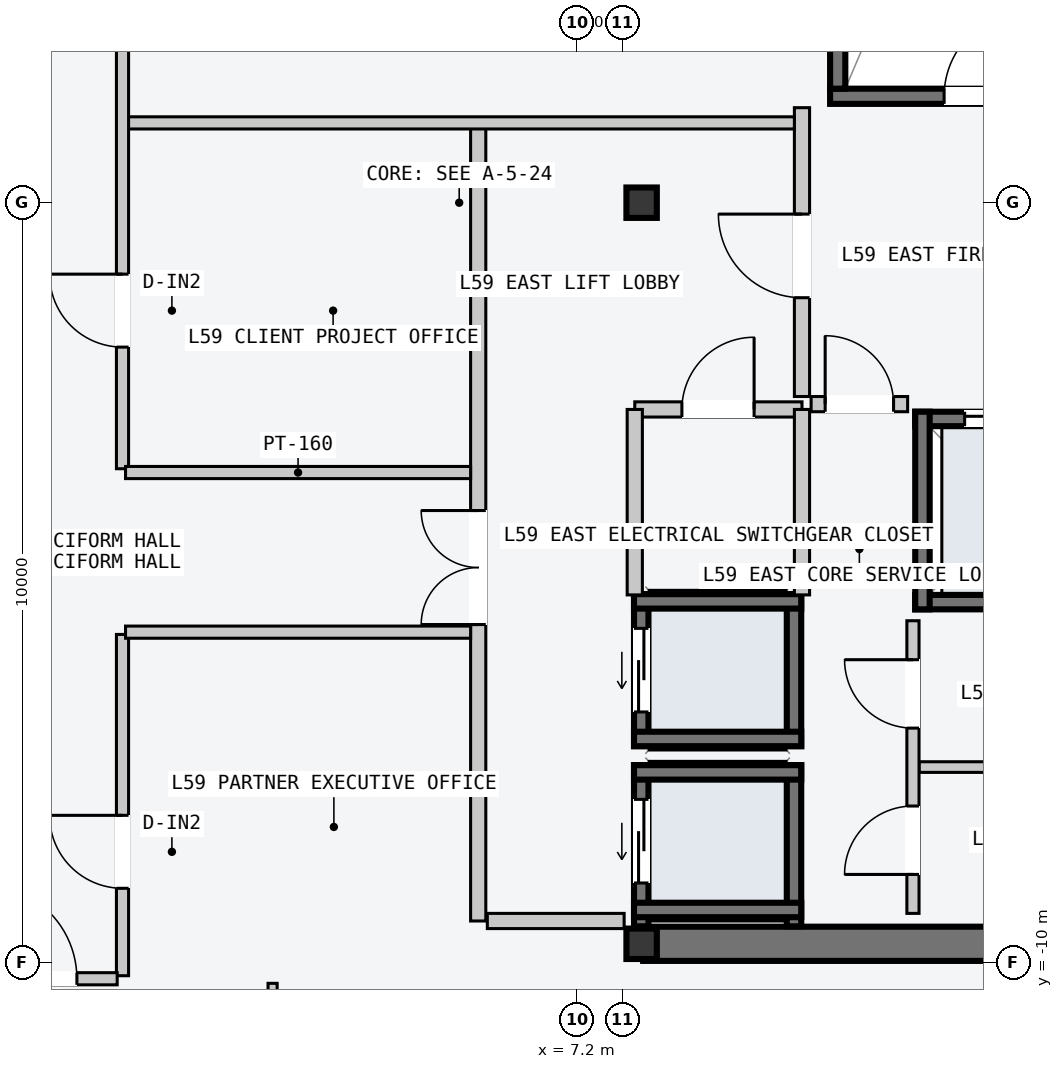
"""IFC4 building model, lengths in metres.
Left out: names, types, materials, properties, quantities, classifications, styles, units other than length and angle.
Written with IfcOpenShell. Run it as: python <this file> out.ifc"""

import sys

from ifc_helpers import new_model, si_unit, direction, frame, frame_2d, origin, origin_2d, place, context, subcontext, project, spatial, rectangle, i_section, extrude, element, fill, save


model = new_model("IFC4")
c1 = context("Model", 3, precision=1e-05, world=origin(), true_north=direction((0.0, 1.0)))
c2 = subcontext(c1, "Body", "Model", "MODEL_VIEW")
j1 = project(units=[si_unit("LENGTHUNIT", "METRE"), si_unit("PLANEANGLEUNIT", "RADIAN")], contexts=[c1])
p1 = place(None, origin())
s1 = spatial("IfcSite", under=j1, at=p1, CompositionType="ELEMENT")
p2 = place(p1, origin())
s2 = spatial("IfcBuilding", under=s1, at=p2, CompositionType="ELEMENT")
p3 = place(p2, frame((0.0, 0.0, 225.6)))
s3 = spatial("IfcBuildingStorey", under=s2, at=p3, CompositionType="ELEMENT", Elevation=225.6)
p4 = place(p3, frame((8.07, -9.75, -0.2), z_axis=(0.0, 0.0, 1.0), x_axis=(1.0, 0.0, 0.0)))
e1 = element("IfcWall", 1, at=p4, inside=s3, PredefinedType="SHEAR", context=c2, shape_type="SweptSolid", body=[
    extrude(rectangle(XDim=6.46, YDim=0.45, at=frame_2d((3.23, 0.0))), origin(), (0.0, 0.0, 1.0), 3.6),
])
p5 = place(p3, frame((10.53, 1.4, -0.2), z_axis=(0.0, 0.0, 1.0), x_axis=(1.0, 0.0, 0.0)))
e2 = element("IfcWall", 2, at=p5, inside=s3, PredefinedType="SOLIDWALL", context=c2, shape_type="SweptSolid", body=[
    extrude(rectangle(XDim=3.72, YDim=0.2, at=frame_2d((1.86, 0.0))), origin(), (0.0, 0.0, 1.0), 3.6),
])
p6 = place(p5, frame((1.5, 0.0, 0.2)))
e3 = element("IfcOpeningElement", 3, at=p6, cuts=e2, PredefinedType="OPENING", context=c2, shape_type="SweptSolid", body=[
    extrude(rectangle(XDim=1.12, YDim=2.18, at=frame_2d((0.56, 1.09))), frame((0.0, 0.11, 0.0), z_axis=(0.0, -1.0, 0.0), x_axis=(1.0, 0.0, 0.0)), (0.0, 0.0, 1.0), 0.22),
])
p7 = place(p3, frame((10.63, 1.5, -0.2), z_axis=(0.0, 0.0, 1.0), x_axis=(0.0, 1.0, 0.0)))
e4 = element("IfcWall", 4, at=p7, inside=s3, PredefinedType="SOLIDWALL", context=c2, shape_type="SweptSolid", body=[
    extrude(rectangle(XDim=7.8, YDim=0.2, at=frame_2d((3.9, 0.0))), origin(), (0.0, 0.0, 1.0), 3.6),
])
for number, where, z_axis, x_axis in (
    (5, (8.05, -9.75, 0.0), (0.0, 0.0, 1.0), (1.0, 0.0, 0.0)),
    (6, (8.05, 0.0, 0.0), (0.0, 0.0, 1.0), (1.0, 0.0, 0.0)),
):
    element("IfcColumn", number, at=place(p3, frame(where, z_axis=z_axis, x_axis=x_axis)), inside=s3, PredefinedType="COLUMN", context=c2, shape_type="SweptSolid", body=[
        extrude(i_section(OverallWidth=0.4, OverallDepth=0.4, WebThickness=0.013, FlangeThickness=0.021, at=origin_2d()), origin(), (0.0, 0.0, 1.0), 3.6),
    ])
p8 = place(p3, frame((8.045, -9.52, -0.2), z_axis=(0.0, 0.0, 1.0), x_axis=(0.0, 1.0, 0.0)))
e7 = element("IfcWall", 7, at=p8, inside=s3, PredefinedType="SOLIDWALL", context=c2, shape_type="SweptSolid", body=[
    extrude(rectangle(XDim=2.12, YDim=0.19, at=frame_2d((1.06, 0.0))), origin(), (0.0, 0.0, 1.0), 3.6),
])
p9 = place(p8, frame((0.57, 0.0, 0.2)))
e8 = element("IfcOpeningElement", 8, at=p9, cuts=e7, PredefinedType="OPENING", context=c2, shape_type="SweptSolid", body=[
    extrude(rectangle(XDim=1.1, YDim=2.2, at=frame_2d((0.55, 1.1))), frame((0.0, 0.105, 0.0), z_axis=(0.0, -1.0, 0.0), x_axis=(1.0, 0.0, 0.0)), (0.0, 0.0, 1.0), 0.21),
])
p10 = place(p3, frame((10.055, -9.52, -0.2), z_axis=(0.0, 0.0, 1.0), x_axis=(0.0, 1.0, 0.0)))
e9 = element("IfcWall", 9, at=p10, inside=s3, PredefinedType="SOLIDWALL", context=c2, shape_type="SweptSolid", body=[
    extrude(rectangle(XDim=2.12, YDim=0.19, at=frame_2d((1.06, 0.0))), origin(), (0.0, 0.0, 1.0), 3.6),
])
for number, where, z_axis, x_axis in (
    (10, (7.95, -7.495, -0.2), (0.0, 0.0, 1.0), (1.0, 0.0, 0.0)),
    (11, (7.95, -9.305, -0.2), (0.0, 0.0, 1.0), (1.0, 0.0, 0.0)),
):
    element("IfcWall", number, at=place(p3, frame(where, z_axis=z_axis, x_axis=x_axis)), inside=s3, PredefinedType="SOLIDWALL", context=c2, shape_type="SweptSolid", body=[
        extrude(rectangle(XDim=2.2, YDim=0.19, at=frame_2d((1.1, 0.0))), origin(), (0.0, 0.0, 1.0), 3.6),
    ])
p11 = place(p3, frame((8.045, -7.15, -0.2), z_axis=(0.0, 0.0, 1.0), x_axis=(0.0, 1.0, 0.0)))
e12 = element("IfcWall", 12, at=p11, inside=s3, PredefinedType="SOLIDWALL", context=c2, shape_type="SweptSolid", body=[
    extrude(rectangle(XDim=2.0, YDim=0.19, at=frame_2d((1.0, 0.0))), origin(), (0.0, 0.0, 1.0), 3.6),
])
p12 = place(p11, frame((0.45, 0.0, 0.2)))
e13 = element("IfcOpeningElement", 13, at=p12, cuts=e12, PredefinedType="OPENING", context=c2, shape_type="SweptSolid", body=[
    extrude(rectangle(XDim=1.1, YDim=2.2, at=frame_2d((0.55, 1.1))), frame((0.0, 0.105, 0.0), z_axis=(0.0, -1.0, 0.0), x_axis=(1.0, 0.0, 0.0)), (0.0, 0.0, 1.0), 0.21),
])
p13 = place(p3, frame((10.055, -7.15, -0.2), z_axis=(0.0, 0.0, 1.0), x_axis=(0.0, 1.0, 0.0)))
e14 = element("IfcWall", 14, at=p13, inside=s3, PredefinedType="SOLIDWALL", context=c2, shape_type="SweptSolid", body=[
    extrude(rectangle(XDim=2.0, YDim=0.19, at=frame_2d((1.0, 0.0))), origin(), (0.0, 0.0, 1.0), 3.6),
])
for number, where, z_axis, x_axis in (
    (15, (7.95, -5.245, -0.2), (0.0, 0.0, 1.0), (1.0, 0.0, 0.0)),
    (16, (7.95, -7.055, -0.2), (0.0, 0.0, 1.0), (1.0, 0.0, 0.0)),
):
    element("IfcWall", number, at=place(p3, frame(where, z_axis=z_axis, x_axis=x_axis)), inside=s3, PredefinedType="SOLIDWALL", context=c2, shape_type="SweptSolid", body=[
        extrude(rectangle(XDim=2.2, YDim=0.19, at=frame_2d((1.1, 0.0))), origin(), (0.0, 0.0, 1.0), 3.6),
    ])
p14 = place(p3, frame((11.65, -2.845, -0.2), z_axis=(0.0, 0.0, 1.0), x_axis=(1.0, 0.0, 0.0)))
e17 = element("IfcWall", 17, at=p14, inside=s3, PredefinedType="SOLIDWALL", context=c2, shape_type="SweptSolid", body=[
    extrude(rectangle(XDim=2.68, YDim=0.19, at=frame_2d((1.34, 0.0))), origin(), (0.0, 0.0, 1.0), 3.6),
])
p15 = place(p14, frame((0.65, 0.0, 0.2)))
e18 = element("IfcOpeningElement", 18, at=p15, cuts=e17, PredefinedType="OPENING", context=c2, shape_type="SweptSolid", body=[
    extrude(rectangle(XDim=1.2, YDim=2.2, at=frame_2d((0.6, 1.1))), frame((0.0, 0.105, 0.0), z_axis=(0.0, -1.0, 0.0), x_axis=(1.0, 0.0, 0.0)), (0.0, 0.0, 1.0), 0.21),
])
p16 = place(p3, frame((11.65, -5.255, -0.2), z_axis=(0.0, 0.0, 1.0), x_axis=(1.0, 0.0, 0.0)))
e19 = element("IfcWall", 19, at=p16, inside=s3, PredefinedType="SOLIDWALL", context=c2, shape_type="SweptSolid", body=[
    extrude(rectangle(XDim=2.68, YDim=0.19, at=frame_2d((1.34, 0.0))), origin(), (0.0, 0.0, 1.0), 3.6),
])
p17 = place(p3, frame((11.745, -5.35, -0.2), z_axis=(0.0, 0.0, 1.0), x_axis=(0.0, 1.0, 0.0)))
e20 = element("IfcWall", 20, at=p17, inside=s3, PredefinedType="SOLIDWALL", context=c2, shape_type="SweptSolid", body=[
    extrude(rectangle(XDim=2.6, YDim=0.19, at=frame_2d((1.3, 0.0))), origin(), (0.0, 0.0, 1.0), 3.6),
])
p18 = place(p3, frame((5.9, -9.45, 0.0), z_axis=(0.0, 0.0, 1.0), x_axis=(0.0, 1.0, 0.0)))
e21 = element("IfcWall", 21, at=p18, inside=s3, PredefinedType="PARTITIONING", context=c2, shape_type="SweptSolid", body=[
    extrude(rectangle(XDim=10.5, YDim=0.2, at=frame_2d((5.25, 0.0))), origin(), (0.0, 0.0, 1.0), 3.4),
])
p19 = place(p18, frame((3.9, 0.0, 0.0)))
e22 = element("IfcOpeningElement", 22, at=p19, cuts=e21, PredefinedType="OPENING", context=c2, shape_type="SweptSolid", body=[
    extrude(rectangle(XDim=1.5, YDim=2.2, at=frame_2d((0.75, 1.1))), frame((0.0, 0.11, 0.0), z_axis=(0.0, -1.0, 0.0), x_axis=(1.0, 0.0, 0.0)), (0.0, 0.0, 1.0), 0.22),
])
p20 = place(p3, frame((6.02, -9.45, 0.0), z_axis=(0.0, 0.0, 1.0), x_axis=(1.0, 0.0, 0.0)))
e23 = element("IfcWall", 23, at=p20, inside=s3, PredefinedType="PARTITIONING", context=c2, shape_type="SweptSolid", body=[
    extrude(rectangle(XDim=1.8, YDim=0.2, at=frame_2d((0.9, 0.0))), origin(), (0.0, 0.0, 1.0), 3.4),
])
p21 = place(p3, frame((10.16, -2.55, 0.0), z_axis=(0.0, 0.0, 1.0), x_axis=(0.0, 1.0, 0.0)))
e24 = element("IfcWall", 24, at=p21, inside=s3, PredefinedType="PARTITIONING", context=c2, shape_type="SweptSolid", body=[
    extrude(rectangle(XDim=3.8, YDim=0.2, at=frame_2d((1.9, 0.0))), origin(), (0.0, 0.0, 1.0), 3.4),
])
p22 = place(p21, frame((1.3, 0.0, 0.0)))
e25 = element("IfcOpeningElement", 25, at=p22, cuts=e24, PredefinedType="OPENING", context=c2, shape_type="SweptSolid", body=[
    extrude(rectangle(XDim=1.1, YDim=2.15, at=frame_2d((0.55, 1.075))), frame((0.0, 0.11, 0.0), z_axis=(0.0, -1.0, 0.0), x_axis=(1.0, 0.0, 0.0)), (0.0, 0.0, 1.0), 0.22),
])
p23 = place(p3, frame((10.28, -2.65, 0.0), z_axis=(0.0, 0.0, 1.0), x_axis=(1.0, 0.0, 0.0)))
e26 = element("IfcWall", 26, at=p23, inside=s3, PredefinedType="PARTITIONING", context=c2, shape_type="SweptSolid", body=[
    extrude(rectangle(XDim=1.27, YDim=0.2, at=frame_2d((0.635, 0.0))), origin(), (0.0, 0.0, 1.0), 3.4),
])
p24 = place(p23, frame((0.185, 0.0, 0.0)))
e27 = element("IfcOpeningElement", 27, at=p24, cuts=e26, PredefinedType="OPENING", context=c2, shape_type="SweptSolid", body=[
    extrude(rectangle(XDim=0.9, YDim=2.15, at=frame_2d((0.45, 1.075))), frame((0.0, 0.11, 0.0), z_axis=(0.0, -1.0, 0.0), x_axis=(1.0, 0.0, 0.0)), (0.0, 0.0, 1.0), 0.22),
])
p25 = place(p3, frame((7.96, -2.72, 0.0), z_axis=(0.0, 0.0, 1.0), x_axis=(1.0, 0.0, 0.0)))
e28 = element("IfcWall", 28, at=p25, inside=s3, PredefinedType="PARTITIONING", context=c2, shape_type="SweptSolid", body=[
    extrude(rectangle(XDim=2.2, YDim=0.2, at=frame_2d((1.1, 0.0))), origin(), (0.0, 0.0, 1.0), 3.4),
])
p26 = place(p25, frame((0.62, 0.0, 0.0)))
e29 = element("IfcOpeningElement", 29, at=p26, cuts=e28, PredefinedType="OPENING", context=c2, shape_type="SweptSolid", body=[
    extrude(rectangle(XDim=0.95, YDim=2.1, at=frame_2d((0.475, 1.05))), frame((0.0, 0.11, 0.0), z_axis=(0.0, -1.0, 0.0), x_axis=(1.0, 0.0, 0.0)), (0.0, 0.0, 1.0), 0.22),
])
for number, where, z_axis, x_axis in (
    (30, (7.96, -5.16, 0.0), (0.0, 0.0, 1.0), (0.0, 1.0, 0.0)),
    (31, (10.16, -5.16, 0.0), (0.0, 0.0, 1.0), (0.0, 1.0, 0.0)),
):
    element("IfcWall", number, at=place(p3, frame(where, z_axis=z_axis, x_axis=x_axis)), inside=s3, PredefinedType="PARTITIONING", context=c2, shape_type="SweptSolid", body=[
        extrude(rectangle(XDim=2.44, YDim=0.2, at=frame_2d((1.22, 0.0))), origin(), (0.0, 0.0, 1.0), 3.4),
    ])
p27 = place(p3, frame((11.7, -7.425, 0.0), z_axis=(0.0, 0.0, 1.0), x_axis=(1.0, 0.0, 0.0)))
e32 = element("IfcWall", 32, at=p27, inside=s3, PredefinedType="PARTITIONING", context=c2, shape_type="SweptSolid", body=[
    extrude(rectangle(XDim=2.5, YDim=0.14, at=frame_2d((1.25, 0.0))), origin(), (0.0, 0.0, 1.0), 3.4),
])
p28 = place(p3, frame((11.62, -9.35, 0.0), z_axis=(0.0, 0.0, 1.0), x_axis=(0.0, 1.0, 0.0)))
e33 = element("IfcWall", 33, at=p28, inside=s3, PredefinedType="PARTITIONING", context=c2, shape_type="SweptSolid", body=[
    extrude(rectangle(XDim=3.85, YDim=0.16, at=frame_2d((1.925, 0.0))), origin(), (0.0, 0.0, 1.0), 3.4),
])
p29 = place(p28, frame((0.512, 0.0, 0.0)))
e34 = element("IfcOpeningElement", 34, at=p29, cuts=e33, PredefinedType="OPENING", context=c2, shape_type="SweptSolid", body=[
    extrude(rectangle(XDim=0.9, YDim=2.15, at=frame_2d((0.45, 1.075))), frame((0.0, 0.09, 0.0), z_axis=(0.0, -1.0, 0.0), x_axis=(1.0, 0.0, 0.0)), (0.0, 0.0, 1.0), 0.18),
])
p30 = place(p28, frame((2.438, 0.0, 0.0)))
e35 = element("IfcOpeningElement", 35, at=p30, cuts=e33, PredefinedType="OPENING", context=c2, shape_type="SweptSolid", body=[
    extrude(rectangle(XDim=0.9, YDim=2.15, at=frame_2d((0.45, 1.075))), frame((0.0, 0.09, 0.0), z_axis=(0.0, -1.0, 0.0), x_axis=(1.0, 0.0, 0.0)), (0.0, 0.0, 1.0), 0.18),
])
p31 = place(p3, frame((1.26, 1.05, 0.0), z_axis=(0.0, 0.0, 1.0), x_axis=(1.0, 0.0, 0.0)))
e36 = element("IfcWall", 36, at=p31, inside=s3, PredefinedType="PARTITIONING", context=c2, shape_type="SweptSolid", body=[
    extrude(rectangle(XDim=8.8, YDim=0.16, at=frame_2d((4.4, 0.0))), origin(), (0.0, 0.0, 1.0), 3.4),
])
p32 = place(p3, frame((1.22, -3.5, 0.0), z_axis=(0.0, 0.0, 1.0), x_axis=(0.0, 1.0, 0.0)))
e37 = element("IfcWall", 37, at=p32, inside=s3, PredefinedType="PARTITIONING", context=c2, shape_type="SweptSolid", body=[
    extrude(rectangle(XDim=12.81, YDim=0.16, at=frame_2d((6.405, 0.0))), origin(), (0.0, 0.0, 1.0), 3.4),
])
p33 = place(p32, frame((6.1, 0.0, 0.0)))
e38 = element("IfcOpeningElement", 38, at=p33, cuts=e37, PredefinedType="OPENING", context=c2, shape_type="SweptSolid", body=[
    extrude(rectangle(XDim=1.24, YDim=2.24, at=frame_2d((0.62, 1.12))), frame((0.0, 0.09, 0.0), z_axis=(0.0, -1.0, 0.0), x_axis=(1.0, 0.0, 0.0)), (0.0, 0.0, 1.0), 0.18),
])
p34 = place(p32, frame((1.6, 0.0, 0.0)))
e39 = element("IfcOpeningElement", 39, at=p34, cuts=e37, PredefinedType="OPENING", context=c2, shape_type="SweptSolid", body=[
    extrude(rectangle(XDim=0.96, YDim=2.18, at=frame_2d((0.48, 1.09))), frame((0.0, 0.09, 0.0), z_axis=(0.0, -1.0, 0.0), x_axis=(1.0, 0.0, 0.0)), (0.0, 0.0, 1.0), 0.18),
])
p35 = place(p3, frame((1.26, -3.55, 0.0), z_axis=(0.0, 0.0, 1.0), x_axis=(1.0, 0.0, 0.0)))
e40 = element("IfcWall", 40, at=p35, inside=s3, PredefinedType="PARTITIONING", context=c2, shape_type="SweptSolid", body=[
    extrude(rectangle(XDim=4.54, YDim=0.16, at=frame_2d((2.27, 0.0))), origin(), (0.0, 0.0, 1.0), 3.4),
])
p36 = place(p3, frame((1.22, -10.17, 0.0), z_axis=(0.0, 0.0, 1.0), x_axis=(0.0, 1.0, 0.0)))
e41 = element("IfcWall", 41, at=p36, inside=s3, PredefinedType="PARTITIONING", context=c2, shape_type="SweptSolid", body=[
    extrude(rectangle(XDim=4.49, YDim=0.16, at=frame_2d((2.245, 0.0))), origin(), (0.0, 0.0, 1.0), 3.4),
])
p37 = place(p36, frame((1.15, 0.0, 0.0)))
e42 = element("IfcOpeningElement", 42, at=p37, cuts=e41, PredefinedType="OPENING", context=c2, shape_type="SweptSolid", body=[
    extrude(rectangle(XDim=0.96, YDim=2.18, at=frame_2d((0.48, 1.09))), frame((0.0, 0.09, 0.0), z_axis=(0.0, -1.0, 0.0), x_axis=(1.0, 0.0, 0.0)), (0.0, 0.0, 1.0), 0.18),
])
p38 = place(p3, frame((1.26, -5.65, 0.0), z_axis=(0.0, 0.0, 1.0), x_axis=(1.0, 0.0, 0.0)))
e43 = element("IfcWall", 43, at=p38, inside=s3, PredefinedType="PARTITIONING", context=c2, shape_type="SweptSolid", body=[
    extrude(rectangle(XDim=4.54, YDim=0.16, at=frame_2d((2.27, 0.0))), origin(), (0.0, 0.0, 1.0), 3.4),
])
p39 = place(p3, frame((3.195, -17.56, 0.0), z_axis=(0.0, 0.0, 1.0), x_axis=(0.0, 1.0, 0.0)))
e44 = element("IfcWall", 44, at=p39, inside=s3, PredefinedType="PARTITIONING", context=c2, shape_type="SweptSolid", body=[
    extrude(rectangle(XDim=7.29, YDim=0.12, at=frame_2d((3.645, 0.0))), origin(), (0.0, 0.0, 1.0), 3.4),
])
p40 = place(p39, frame((1.05, 0.0, 0.0)))
e45 = element("IfcOpeningElement", 45, at=p40, cuts=e44, PredefinedType="OPENING", context=c2, shape_type="SweptSolid", body=[
    extrude(rectangle(XDim=0.96, YDim=2.18, at=frame_2d((0.48, 1.09))), frame((0.0, 0.07, 0.0), z_axis=(0.0, -1.0, 0.0), x_axis=(1.0, 0.0, 0.0)), (0.0, 0.0, 1.0), 0.14),
])
p41 = place(p3, frame((-1.15, -10.21, 0.0), z_axis=(0.0, 0.0, 1.0), x_axis=(1.0, 0.0, 0.0)))
e46 = element("IfcWall", 46, at=p41, inside=s3, PredefinedType="PARTITIONING", context=c2, shape_type="SweptSolid", body=[
    extrude(rectangle(XDim=2.3, YDim=0.16, at=frame_2d((1.15, 0.0))), origin(), (0.0, 0.0, 1.0), 3.4),
])
p42 = place(p41, frame((0.53, 0.0, 0.0)))
e47 = element("IfcOpeningElement", 47, at=p42, cuts=e46, PredefinedType="OPENING", context=c2, shape_type="SweptSolid", body=[
    extrude(rectangle(XDim=1.24, YDim=2.24, at=frame_2d((0.62, 1.12))), frame((0.0, 0.09, 0.0), z_axis=(0.0, -1.0, 0.0), x_axis=(1.0, 0.0, 0.0)), (0.0, 0.0, 1.0), 0.18),
])
p43 = place(p6, origin())
e48 = element("IfcDoor", 48, at=p43, inside=s3, OperationType="SINGLE_SWING_RIGHT", PredefinedType="DOOR", context=c2, shape_type="SweptSolid", body=[
    extrude(rectangle(XDim=1.12, YDim=2.18, at=frame_2d((0.56, 1.09))), frame((0.0, 0.025, 0.0), z_axis=(0.0, -1.0, 0.0), x_axis=(1.0, 0.0, 0.0)), (0.0, 0.0, 1.0), 0.05),
])
fill(e3, e48)
p44 = place(p9, origin())
e49 = element("IfcDoor", 49, at=p44, inside=s3, OperationType="SLIDING_TO_LEFT", PredefinedType="DOOR", context=c2, shape_type="SweptSolid", body=[
    extrude(rectangle(XDim=1.1, YDim=2.2, at=frame_2d((0.55, 1.1))), frame((0.0, 0.025, 0.0), z_axis=(0.0, -1.0, 0.0), x_axis=(1.0, 0.0, 0.0)), (0.0, 0.0, 1.0), 0.05),
])
fill(e8, e49)
p45 = place(p12, origin())
e50 = element("IfcDoor", 50, at=p45, inside=s3, OperationType="SLIDING_TO_LEFT", PredefinedType="DOOR", context=c2, shape_type="SweptSolid", body=[
    extrude(rectangle(XDim=1.1, YDim=2.2, at=frame_2d((0.55, 1.1))), frame((0.0, 0.025, 0.0), z_axis=(0.0, -1.0, 0.0), x_axis=(1.0, 0.0, 0.0)), (0.0, 0.0, 1.0), 0.05),
])
fill(e13, e50)
p46 = place(p15, origin())
e51 = element("IfcDoor", 51, at=p46, inside=s3, OperationType="SLIDING_TO_LEFT", PredefinedType="DOOR", context=c2, shape_type="SweptSolid", body=[
    extrude(rectangle(XDim=1.2, YDim=2.2, at=frame_2d((0.6, 1.1))), frame((0.0, 0.025, 0.0), z_axis=(0.0, -1.0, 0.0), x_axis=(1.0, 0.0, 0.0)), (0.0, 0.0, 1.0), 0.05),
])
fill(e18, e51)
p47 = place(p19, origin())
e52 = element("IfcDoor", 52, at=p47, inside=s3, OperationType="DOUBLE_DOOR_SINGLE_SWING", PredefinedType="DOOR", context=c2, shape_type="SweptSolid", body=[
    extrude(rectangle(XDim=1.5, YDim=2.2, at=frame_2d((0.75, 1.1))), frame((0.0, 0.025, 0.0), z_axis=(0.0, -1.0, 0.0), x_axis=(1.0, 0.0, 0.0)), (0.0, 0.0, 1.0), 0.05),
])
fill(e22, e52)
p48 = place(p22, origin())
e53 = element("IfcDoor", 53, at=p48, inside=s3, OperationType="SINGLE_SWING_RIGHT", PredefinedType="DOOR", context=c2, shape_type="SweptSolid", body=[
    extrude(rectangle(XDim=1.1, YDim=2.15, at=frame_2d((0.55, 1.075))), frame((0.0, 0.025, 0.0), z_axis=(0.0, -1.0, 0.0), x_axis=(1.0, 0.0, 0.0)), (0.0, 0.0, 1.0), 0.05),
])
fill(e25, e53)
p49 = place(p24, origin())
e54 = element("IfcDoor", 54, at=p49, inside=s3, OperationType="SINGLE_SWING_LEFT", PredefinedType="DOOR", context=c2, shape_type="SweptSolid", body=[
    extrude(rectangle(XDim=0.9, YDim=2.15, at=frame_2d((0.45, 1.075))), frame((0.0, 0.025, 0.0), z_axis=(0.0, -1.0, 0.0), x_axis=(1.0, 0.0, 0.0)), (0.0, 0.0, 1.0), 0.05),
])
fill(e27, e54)
p50 = place(p26, origin())
e55 = element("IfcDoor", 55, at=p50, inside=s3, OperationType="SINGLE_SWING_RIGHT", PredefinedType="DOOR", context=c2, shape_type="SweptSolid", body=[
    extrude(rectangle(XDim=0.95, YDim=2.1, at=frame_2d((0.475, 1.05))), frame((0.0, 0.025, 0.0), z_axis=(0.0, -1.0, 0.0), x_axis=(1.0, 0.0, 0.0)), (0.0, 0.0, 1.0), 0.05),
])
fill(e29, e55)
p51 = place(p29, origin())
e56 = element("IfcDoor", 56, at=p51, inside=s3, OperationType="SINGLE_SWING_LEFT", PredefinedType="DOOR", context=c2, shape_type="SweptSolid", body=[
    extrude(rectangle(XDim=0.9, YDim=2.15, at=frame_2d((0.45, 1.075))), frame((0.0, 0.025, 0.0), z_axis=(0.0, -1.0, 0.0), x_axis=(1.0, 0.0, 0.0)), (0.0, 0.0, 1.0), 0.05),
])
fill(e34, e56)
p52 = place(p30, origin())
e57 = element("IfcDoor", 57, at=p52, inside=s3, OperationType="SINGLE_SWING_RIGHT", PredefinedType="DOOR", context=c2, shape_type="SweptSolid", body=[
    extrude(rectangle(XDim=0.9, YDim=2.15, at=frame_2d((0.45, 1.075))), frame((0.0, 0.025, 0.0), z_axis=(0.0, -1.0, 0.0), x_axis=(1.0, 0.0, 0.0)), (0.0, 0.0, 1.0), 0.05),
])
fill(e35, e57)
p53 = place(p34, origin())
e58 = element("IfcDoor", 58, at=p53, inside=s3, OperationType="SINGLE_SWING_RIGHT", PredefinedType="DOOR", context=c2, shape_type="SweptSolid", body=[
    extrude(rectangle(XDim=0.96, YDim=2.18, at=frame_2d((0.48, 1.09))), frame((0.0, 0.025, 0.0), z_axis=(0.0, -1.0, 0.0), x_axis=(1.0, 0.0, 0.0)), (0.0, 0.0, 1.0), 0.05),
])
fill(e39, e58)
p54 = place(p37, origin())
e59 = element("IfcDoor", 59, at=p54, inside=s3, OperationType="SINGLE_SWING_RIGHT", PredefinedType="DOOR", context=c2, shape_type="SweptSolid", body=[
    extrude(rectangle(XDim=0.96, YDim=2.18, at=frame_2d((0.48, 1.09))), frame((0.0, 0.025, 0.0), z_axis=(0.0, -1.0, 0.0), x_axis=(1.0, 0.0, 0.0)), (0.0, 0.0, 1.0), 0.05),
])
fill(e42, e59)
p55 = place(p42, origin())
e60 = element("IfcDoor", 60, at=p55, inside=s3, OperationType="SINGLE_SWING_LEFT", PredefinedType="DOOR", context=c2, shape_type="SweptSolid", body=[
    extrude(rectangle(XDim=1.24, YDim=2.24, at=frame_2d((0.62, 1.12))), frame((0.0, 0.025, 0.0), z_axis=(0.0, -1.0, 0.0), x_axis=(1.0, 0.0, 0.0)), (0.0, 0.0, 1.0), 0.05),
])
fill(e47, e60)
save(model, sys.argv[1])
